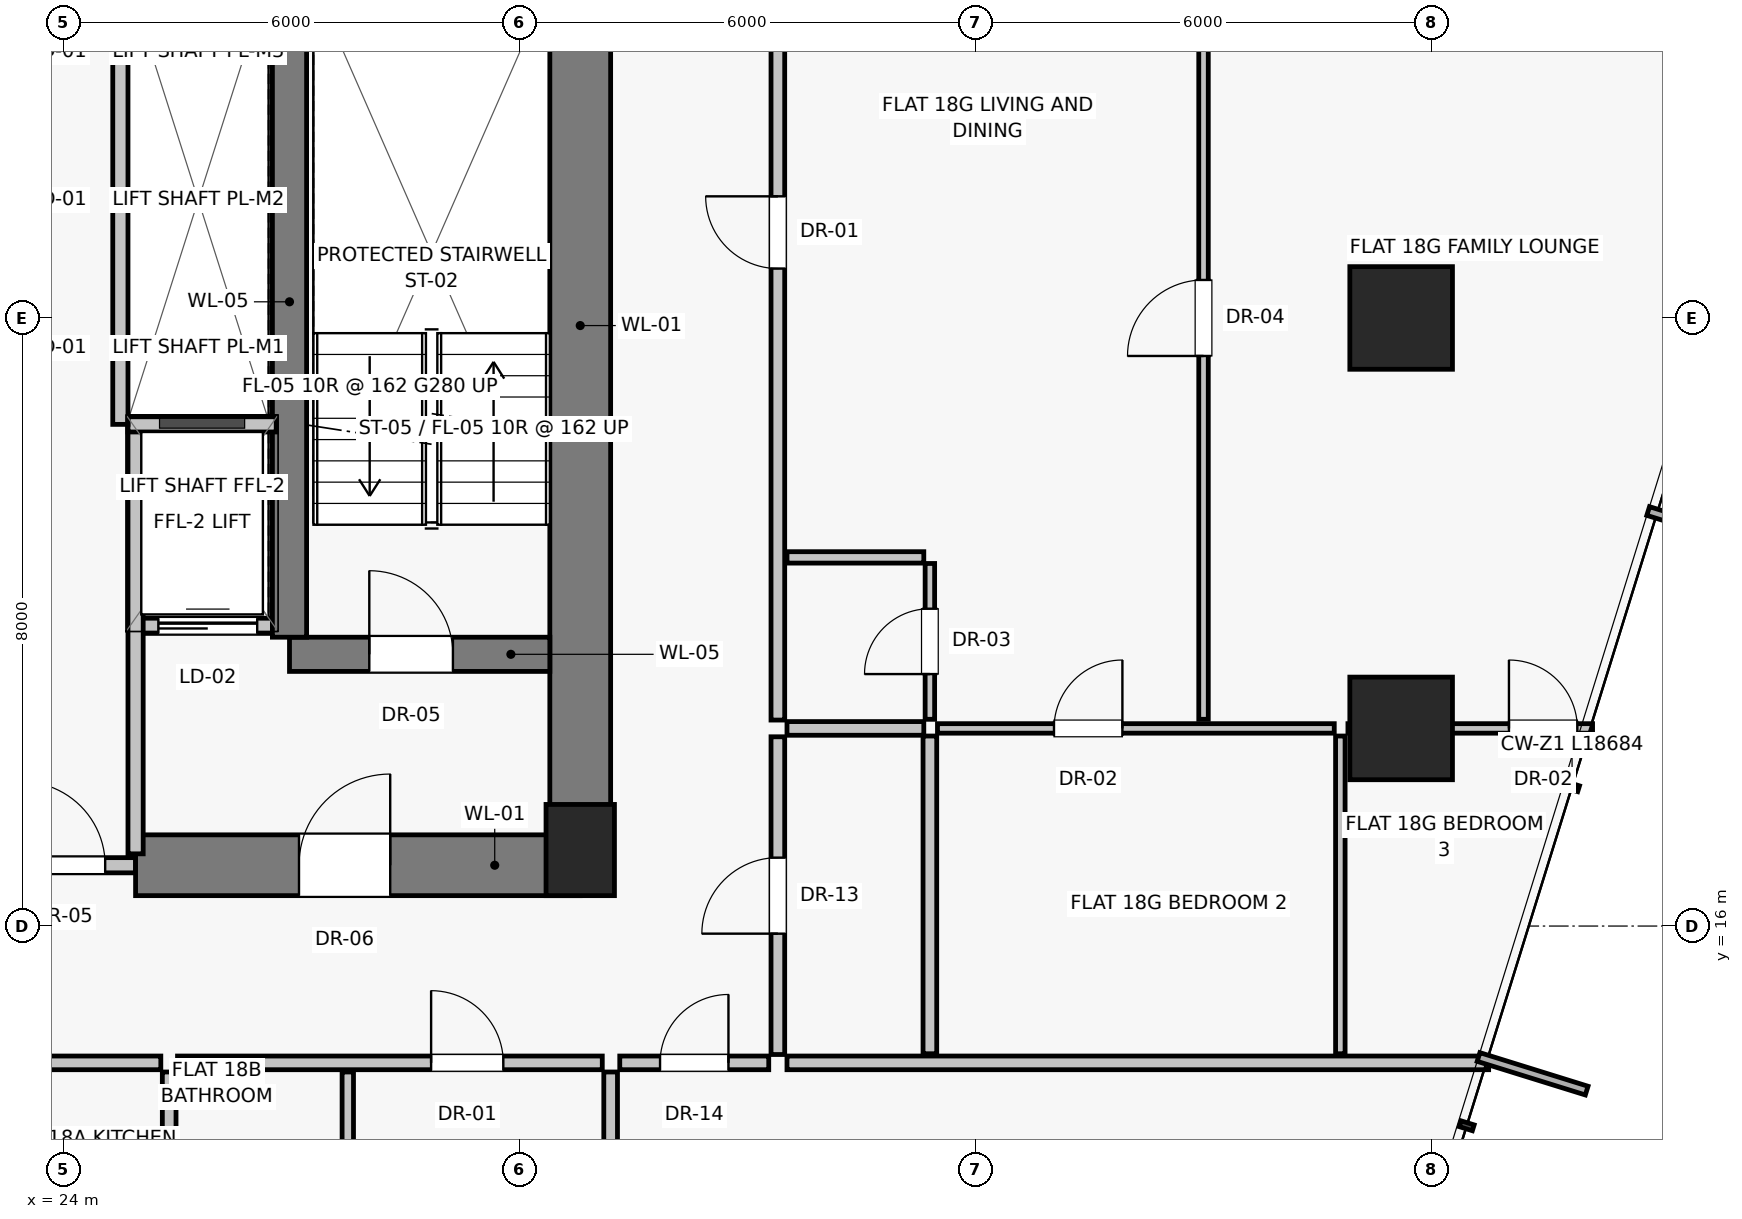
"""IFC4 building model, lengths in metres.
Left out: names, types, materials, properties, quantities, classifications, styles, units other than length and angle.
Written with IfcOpenShell. Run it as: python <this file> out.ifc"""

import sys

from ifc_helpers import new_model, si_unit, direction, frame, frame_2d, origin, origin_2d, place, context, subcontext, project, spatial, rectangle, extrude, source, transform, mapped, element, fill, save


model = new_model("IFC4")
c1 = context("Model", 3, precision=1e-05, world=origin(), true_north=direction((0.0, 1.0)))
c2 = subcontext(c1, "Body", "Model", "MODEL_VIEW")
j1 = project(units=[si_unit("LENGTHUNIT", "METRE"), si_unit("PLANEANGLEUNIT", "RADIAN")], contexts=[c1])
p1 = place(None, origin())
s1 = spatial("IfcSite", under=j1, at=p1, CompositionType="ELEMENT")
p2 = place(p1, origin())
s2 = spatial("IfcBuilding", under=s1, at=p2, CompositionType="ELEMENT")
p3 = place(p2, frame((0.0, 0.0, 67.35)))
s3 = spatial("IfcBuildingStorey", under=s2, at=p3, CompositionType="ELEMENT", Elevation=67.35)
p4 = place(p3, frame((30.8, 17.0, 0.0), z_axis=(0.0, 0.0, 1.0), x_axis=(1.0, 0.0, 0.0)))
e1 = element("IfcColumn", 1, at=p4, inside=s3, PredefinedType="PILASTER", context=c2, shape_type="SweptSolid", body=[
    extrude(rectangle(XDim=0.9, YDim=1.2, at=origin_2d()), origin(), (0.0, 0.0, 1.0), 3.25),
])
for number, where, z_axis, x_axis in (
    (2, (41.6, 18.6, 0.0), (0.0, 0.0, 1.0), (1.0, 0.0, 0.0)),
    (3, (41.6, 24.0, 0.0), (0.0, 0.0, 1.0), (1.0, 0.0, 0.0)),
):
    element("IfcColumn", number, at=place(p3, frame(where, z_axis=z_axis, x_axis=x_axis)), inside=s3, PredefinedType="COLUMN", context=c2, shape_type="SweptSolid", body=[
        extrude(rectangle(XDim=1.35, YDim=1.35, at=origin_2d()), origin(), (0.0, 0.0, 1.0), 3.25),
    ])
p5 = place(p3, frame((30.8, 16.8, 0.0), z_axis=(0.0, 0.0, 1.0), x_axis=(0.0, 1.0, 0.0)))
e4 = element("IfcWall", 4, at=p5, inside=s3, PredefinedType="SHEAR", context=c2, shape_type="SweptSolid", body=[
    extrude(rectangle(XDim=14.2, YDim=0.8, at=frame_2d((7.1, 0.0))), origin(), (0.0, 0.0, 1.0), 3.0),
])
p6 = place(p3, frame((23.05, 16.8, 0.0), z_axis=(0.0, 0.0, 1.0), x_axis=(1.0, 0.0, 0.0)))
e5 = element("IfcWall", 5, at=p6, inside=s3, PredefinedType="SOLIDWALL", context=c2, shape_type="SweptSolid", body=[
    extrude(rectangle(XDim=1.9, YDim=0.2, at=frame_2d((0.95, 0.0))), origin(), (0.0, 0.0, 1.0), 2.15),
])
p7 = place(p6, frame((0.4, 0.0, 0.0)))
e6 = element("IfcOpeningElement", 6, at=p7, cuts=e5, PredefinedType="OPENING", context=c2, shape_type="SweptSolid", body=[
    extrude(rectangle(XDim=1.1, YDim=2.03, at=frame_2d((0.55, 1.015))), frame((0.0, 0.11, 0.0), z_axis=(0.0, -1.0, 0.0), x_axis=(1.0, 0.0, 0.0)), (0.0, 0.0, 1.0), 0.22),
])
p8 = place(p3, frame((24.95, 16.8, 0.0), z_axis=(0.0, 0.0, 1.0), x_axis=(1.0, 0.0, 0.0)))
e7 = element("IfcWall", 7, at=p8, inside=s3, PredefinedType="SHEAR", context=c2, shape_type="SweptSolid", body=[
    extrude(rectangle(XDim=5.85, YDim=0.8, at=frame_2d((2.925, 0.0))), origin(), (0.0, 0.0, 1.0), 3.0),
])
p9 = place(p8, frame((2.15, 0.0, 0.0)))
e8 = element("IfcOpeningElement", 8, at=p9, cuts=e7, PredefinedType="OPENING", context=c2, shape_type="SweptSolid", body=[
    extrude(rectangle(XDim=1.2, YDim=2.03, at=frame_2d((0.6, 1.015))), frame((0.0, 0.41, 0.0), z_axis=(0.0, -1.0, 0.0), x_axis=(1.0, 0.0, 0.0)), (0.0, 0.0, 1.0), 0.82),
])
p10 = place(p3, frame((24.95, 19.95, 0.0), z_axis=(0.0, 0.0, 1.0), x_axis=(1.0, 0.0, 0.0)))
e9 = element("IfcWall", 9, at=p10, inside=s3, PredefinedType="SOLIDWALL", context=c2, shape_type="SweptSolid", body=[
    extrude(rectangle(XDim=1.85, YDim=0.2, at=frame_2d((0.925, 0.0))), origin(), (0.0, 0.0, 1.0), 3.0),
])
p11 = place(p10, frame((0.3, 0.0, 0.0)))
e10 = element("IfcOpeningElement", 10, at=p11, cuts=e9, PredefinedType="OPENING", context=c2, shape_type="SweptSolid", body=[
    extrude(rectangle(XDim=1.3, YDim=2.25, at=frame_2d((0.65, 1.125))), frame((0.0, 0.11, 0.0), z_axis=(0.0, -1.0, 0.0), x_axis=(1.0, 0.0, 0.0)), (0.0, 0.0, 1.0), 0.22),
])
p12 = place(p3, frame((26.975, 19.575, 0.0), z_axis=(0.0, 0.0, 1.0), x_axis=(1.0, 0.0, 0.0)))
e11 = element("IfcWall", 11, at=p12, inside=s3, PredefinedType="SHEAR", context=c2, shape_type="SweptSolid", body=[
    extrude(rectangle(XDim=3.425, YDim=0.45, at=frame_2d((1.712, 0.0))), origin(), (0.0, 0.0, 1.0), 3.0),
])
p13 = place(p12, frame((1.05, 0.0, 0.0)))
e12 = element("IfcOpeningElement", 12, at=p13, cuts=e11, PredefinedType="OPENING", context=c2, shape_type="SweptSolid", body=[
    extrude(rectangle(XDim=1.1, YDim=2.03, at=frame_2d((0.55, 1.015))), frame((0.0, 0.235, 0.0), z_axis=(0.0, -1.0, 0.0), x_axis=(1.0, 0.0, 0.0)), (0.0, 0.0, 1.0), 0.47),
])
p14 = place(p3, frame((26.975, 19.8, 0.0), z_axis=(0.0, 0.0, 1.0), x_axis=(0.0, 1.0, 0.0)))
e13 = element("IfcWall", 13, at=p14, inside=s3, PredefinedType="SHEAR", context=c2, shape_type="SweptSolid", body=[
    extrude(rectangle(XDim=8.825, YDim=0.45, at=frame_2d((4.413, 0.0))), origin(), (0.0, 0.0, 1.0), 3.0),
])
p15 = place(p3, frame((24.95, 16.95, 0.0), z_axis=(0.0, 0.0, 1.0), x_axis=(0.0, 1.0, 0.0)))
e14 = element("IfcWall", 14, at=p15, inside=s3, PredefinedType="SOLIDWALL", context=c2, shape_type="SweptSolid", body=[
    extrude(rectangle(XDim=5.6, YDim=0.2, at=frame_2d((2.8, 0.0))), origin(), (0.0, 0.0, 1.0), 3.0),
])
p16 = place(p3, frame((24.85, 22.6, 0.0), z_axis=(0.0, 0.0, 1.0), x_axis=(1.0, 0.0, 0.0)))
e15 = element("IfcWall", 15, at=p16, inside=s3, PredefinedType="SOLIDWALL", context=c2, shape_type="SweptSolid", body=[
    extrude(rectangle(XDim=1.95, YDim=0.2, at=frame_2d((0.975, 0.0))), origin(), (0.0, 0.0, 1.0), 3.0),
])
p17 = place(p3, frame((24.75, 22.6, 0.0), z_axis=(0.0, 0.0, 1.0), x_axis=(0.0, 1.0, 0.0)))
e16 = element("IfcWall", 16, at=p17, inside=s3, PredefinedType="SOLIDWALL", context=c2, shape_type="SweptSolid", body=[
    extrude(rectangle(XDim=5.95, YDim=0.2, at=frame_2d((2.975, 0.0))), origin(), (0.0, 0.0, 1.0), 3.0),
])
p18 = place(p3, frame((31.2, 14.08, 0.0), z_axis=(0.0, 0.0, 1.0), x_axis=(0.0, -1.0, 0.0)))
e17 = element("IfcWall", 17, at=p18, inside=s3, PredefinedType="PARTITIONING", context=c2, shape_type="SweptSolid", body=[
    extrude(rectangle(XDim=9.792, YDim=0.18, at=frame_2d((4.896, 0.0))), origin(), (0.0, 0.0, 1.0), 3.0),
])
p19 = place(p3, frame((16.91, 14.2, 0.0), z_axis=(0.0, 0.0, 1.0), x_axis=(1.0, 0.0, 0.0)))
e18 = element("IfcWall", 18, at=p19, inside=s3, PredefinedType="PARTITIONING", context=c2, shape_type="SweptSolid", body=[
    extrude(rectangle(XDim=8.372, YDim=0.18, at=frame_2d((4.186, 0.0))), origin(), (0.0, 0.0, 1.0), 3.0),
])
p20 = place(p19, frame((2.903, 0.0, 0.0)))
e19 = element("IfcOpeningElement", 19, at=p20, cuts=e18, PredefinedType="OPENING", context=c2, shape_type="SweptSolid", body=[
    extrude(rectangle(XDim=0.95, YDim=2.02, at=frame_2d((0.475, 1.01))), frame((0.0, 0.1, 0.0), z_axis=(0.0, -1.0, 0.0), x_axis=(1.0, 0.0, 0.0)), (0.0, 0.0, 1.0), 0.2),
])
p21 = place(p3, frame((25.392, 14.08, 0.0), z_axis=(0.0, 0.0, 1.0), x_axis=(0.0, -1.0, 0.0)))
e20 = element("IfcWall", 20, at=p21, inside=s3, PredefinedType="PARTITIONING", context=c2, shape_type="SweptSolid", body=[
    extrude(rectangle(XDim=11.105, YDim=0.18, at=frame_2d((5.553, 0.0))), origin(), (0.0, 0.0, 1.0), 3.0),
])
p22 = place(p3, frame((25.502, 14.2, 0.0), z_axis=(0.0, 0.0, 1.0), x_axis=(1.0, 0.0, 0.0)))
e21 = element("IfcWall", 21, at=p22, inside=s3, PredefinedType="PARTITIONING", context=c2, shape_type="SweptSolid", body=[
    extrude(rectangle(XDim=5.588, YDim=0.18, at=frame_2d((2.794, 0.0))), origin(), (0.0, 0.0, 1.0), 3.0),
])
p23 = place(p22, frame((3.336, 0.0, 0.0)))
e22 = element("IfcOpeningElement", 22, at=p23, cuts=e21, PredefinedType="OPENING", context=c2, shape_type="SweptSolid", body=[
    extrude(rectangle(XDim=0.95, YDim=2.02, at=frame_2d((0.475, 1.01))), frame((0.0, 0.1, 0.0), z_axis=(0.0, -1.0, 0.0), x_axis=(1.0, 0.0, 0.0)), (0.0, 0.0, 1.0), 0.2),
])
p24 = place(p3, frame((27.742, 14.08, 0.0), z_axis=(0.0, 0.0, 1.0), x_axis=(0.0, -1.0, 0.0)))
e23 = element("IfcWall", 23, at=p24, inside=s3, PredefinedType="PARTITIONING", context=c2, shape_type="SweptSolid", body=[
    extrude(rectangle(XDim=2.05, YDim=0.15, at=frame_2d((1.025, 0.0))), origin(), (0.0, 0.0, 1.0), 3.0),
])
p25 = place(p3, frame((33.52, 14.2, 0.0), z_axis=(0.0, 0.0, 1.0), x_axis=(1.0, 0.0, 0.0)))
e24 = element("IfcWall", 24, at=p25, inside=s3, PredefinedType="PARTITIONING", context=c2, shape_type="SweptSolid", body=[
    extrude(rectangle(XDim=9.231, YDim=0.18, at=frame_2d((4.616, 0.0))), origin(), (0.0, 0.0, 1.0), 3.0),
])
p26 = place(p3, frame((33.4, 14.31, 0.0), z_axis=(0.0, 0.0, 1.0), x_axis=(0.0, 1.0, 0.0)))
e25 = element("IfcWall", 25, at=p26, inside=s3, PredefinedType="PARTITIONING", context=c2, shape_type="SweptSolid", body=[
    extrude(rectangle(XDim=4.18, YDim=0.18, at=frame_2d((2.09, 0.0))), origin(), (0.0, 0.0, 1.0), 3.0),
])
p27 = place(p26, frame((1.59, 0.0, 0.0)))
e26 = element("IfcOpeningElement", 26, at=p27, cuts=e25, PredefinedType="OPENING", context=c2, shape_type="SweptSolid", body=[
    extrude(rectangle(XDim=1.0, YDim=2.01, at=frame_2d((0.5, 1.005))), frame((0.0, 0.1, 0.0), z_axis=(0.0, -1.0, 0.0), x_axis=(1.0, 0.0, 0.0)), (0.0, 0.0, 1.0), 0.2),
])
p28 = place(p3, frame((33.4, 18.71, 0.0), z_axis=(0.0, 0.0, 1.0), x_axis=(0.0, 1.0, 0.0)))
e27 = element("IfcWall", 27, at=p28, inside=s3, PredefinedType="PARTITIONING", context=c2, shape_type="SweptSolid", body=[
    extrude(rectangle(XDim=14.78, YDim=0.18, at=frame_2d((7.39, 0.0))), origin(), (0.0, 0.0, 1.0), 3.0),
])
p29 = place(p28, frame((5.94, 0.0, 0.0)))
e28 = element("IfcOpeningElement", 28, at=p29, cuts=e27, PredefinedType="OPENING", context=c2, shape_type="SweptSolid", body=[
    extrude(rectangle(XDim=0.95, YDim=2.02, at=frame_2d((0.475, 1.01))), frame((0.0, 0.1, 0.0), z_axis=(0.0, -1.0, 0.0), x_axis=(1.0, 0.0, 0.0)), (0.0, 0.0, 1.0), 0.2),
])
p30 = place(p3, frame((40.8, 14.32, 0.0), z_axis=(0.0, 0.0, 1.0), x_axis=(0.0, 1.0, 0.0)))
e29 = element("IfcWall", 29, at=p30, inside=s3, PredefinedType="PARTITIONING", context=c2, shape_type="SweptSolid", body=[
    extrude(rectangle(XDim=4.18, YDim=0.125, at=frame_2d((2.09, 0.0))), origin(), (0.0, 0.0, 1.0), 3.0),
])
p31 = place(p3, frame((40.9, 18.6, 0.0), z_axis=(0.0, 0.0, 1.0), x_axis=(1.0, 0.0, 0.0)))
e30 = element("IfcWall", 30, at=p31, inside=s3, PredefinedType="PARTITIONING", context=c2, shape_type="SweptSolid", body=[
    extrude(rectangle(XDim=3.219, YDim=0.125, at=frame_2d((1.609, 0.0))), origin(), (0.0, 0.0, 1.0), 2.299),
])
p32 = place(p31, frame((2.118, 0.0, 0.0)))
e31 = element("IfcOpeningElement", 31, at=p32, cuts=e30, PredefinedType="OPENING", context=c2, shape_type="SweptSolid", body=[
    extrude(rectangle(XDim=0.9, YDim=2.01, at=frame_2d((0.45, 1.005))), frame((0.0, 0.073, 0.0), z_axis=(0.0, -1.0, 0.0), x_axis=(1.0, 0.0, 0.0)), (0.0, 0.0, 1.0), 0.145),
])
p33 = place(p3, frame((39.0, 18.72, 0.0), z_axis=(0.0, 0.0, 1.0), x_axis=(0.0, 1.0, 0.0)))
e32 = element("IfcWall", 32, at=p33, inside=s3, PredefinedType="PARTITIONING", context=c2, shape_type="SweptSolid", body=[
    extrude(rectangle(XDim=10.56, YDim=0.125, at=frame_2d((5.28, 0.0))), origin(), (0.0, 0.0, 1.0), 3.0),
])
p34 = place(p33, frame((4.78, 0.0, 0.0)))
e33 = element("IfcOpeningElement", 33, at=p34, cuts=e32, PredefinedType="OPENING", context=c2, shape_type="SweptSolid", body=[
    extrude(rectangle(XDim=1.0, YDim=2.01, at=frame_2d((0.5, 1.005))), frame((0.0, 0.073, 0.0), z_axis=(0.0, -1.0, 0.0), x_axis=(1.0, 0.0, 0.0)), (0.0, 0.0, 1.0), 0.145),
])
p35 = place(p3, frame((35.4, 14.32, 0.0), z_axis=(0.0, 0.0, 1.0), x_axis=(0.0, 1.0, 0.0)))
e34 = element("IfcWall", 34, at=p35, inside=s3, PredefinedType="PARTITIONING", context=c2, shape_type="SweptSolid", body=[
    extrude(rectangle(XDim=4.18, YDim=0.18, at=frame_2d((2.09, 0.0))), origin(), (0.0, 0.0, 1.0), 3.0),
])
p36 = place(p3, frame((33.52, 18.6, 0.0), z_axis=(0.0, 0.0, 1.0), x_axis=(1.0, 0.0, 0.0)))
e35 = element("IfcWall", 35, at=p36, inside=s3, PredefinedType="PARTITIONING", context=c2, shape_type="SweptSolid", body=[
    extrude(rectangle(XDim=1.8, YDim=0.18, at=frame_2d((0.9, 0.0))), origin(), (0.0, 0.0, 1.0), 3.0),
])
p37 = place(p3, frame((35.5, 18.6, 0.0), z_axis=(0.0, 0.0, 1.0), x_axis=(1.0, 0.0, 0.0)))
e36 = element("IfcWall", 36, at=p37, inside=s3, PredefinedType="PARTITIONING", context=c2, shape_type="SweptSolid", body=[
    extrude(rectangle(XDim=5.22, YDim=0.125, at=frame_2d((2.61, 0.0))), origin(), (0.0, 0.0, 1.0), 2.299),
])
p38 = place(p37, frame((1.533, 0.0, 0.0)))
e37 = element("IfcOpeningElement", 37, at=p38, cuts=e36, PredefinedType="OPENING", context=c2, shape_type="SweptSolid", body=[
    extrude(rectangle(XDim=0.9, YDim=2.01, at=frame_2d((0.45, 1.005))), frame((0.0, 0.073, 0.0), z_axis=(0.0, -1.0, 0.0), x_axis=(1.0, 0.0, 0.0)), (0.0, 0.0, 1.0), 0.145),
])
p39 = place(p3, frame((33.52, 20.85, 0.0), z_axis=(0.0, 0.0, 1.0), x_axis=(1.0, 0.0, 0.0)))
e38 = element("IfcWall", 38, at=p39, inside=s3, PredefinedType="PARTITIONING", context=c2, shape_type="SweptSolid", body=[
    extrude(rectangle(XDim=1.8, YDim=0.15, at=frame_2d((0.9, 0.0))), origin(), (0.0, 0.0, 1.0), 3.0),
])
p40 = place(p3, frame((35.4, 18.72, 0.0), z_axis=(0.0, 0.0, 1.0), x_axis=(0.0, 1.0, 0.0)))
e39 = element("IfcWall", 39, at=p40, inside=s3, PredefinedType="PARTITIONING", context=c2, shape_type="SweptSolid", body=[
    extrude(rectangle(XDim=2.05, YDim=0.125, at=frame_2d((1.025, 0.0))), origin(), (0.0, 0.0, 1.0), 3.0),
])
p41 = place(p40, frame((0.595, 0.0, 0.0)))
e40 = element("IfcOpeningElement", 40, at=p41, cuts=e39, PredefinedType="OPENING", context=c2, shape_type="SweptSolid", body=[
    extrude(rectangle(XDim=0.86, YDim=2.01, at=frame_2d((0.43, 1.005))), frame((0.0, 0.073, 0.0), z_axis=(0.0, -1.0, 0.0), x_axis=(1.0, 0.0, 0.0)), (0.0, 0.0, 1.0), 0.145),
])
p42 = place(p3, frame((31.32, 14.2, 0.0), z_axis=(0.0, 0.0, 1.0), x_axis=(1.0, 0.0, 0.0)))
e41 = element("IfcWall", 41, at=p42, inside=s3, PredefinedType="PARTITIONING", context=c2, shape_type="SweptSolid", body=[
    extrude(rectangle(XDim=1.96, YDim=0.18, at=frame_2d((0.98, 0.0))), origin(), (0.0, 0.0, 1.0), 3.0),
])
p43 = place(p42, frame((0.53, 0.0, 0.0)))
e42 = element("IfcOpeningElement", 42, at=p43, cuts=e41, PredefinedType="OPENING", context=c2, shape_type="SweptSolid", body=[
    extrude(rectangle(XDim=0.9, YDim=2.01, at=frame_2d((0.45, 1.005))), frame((0.0, 0.1, 0.0), z_axis=(0.0, -1.0, 0.0), x_axis=(1.0, 0.0, 0.0)), (0.0, 0.0, 1.0), 0.2),
])
m1 = source(origin(), c2, "Body", "SweptSolid", [
    extrude(rectangle(XDim=1.1, YDim=2.03, at=frame_2d((0.55, 1.015))), frame((0.0, 0.025, 0.0), z_axis=(0.0, -1.0, 0.0), x_axis=(1.0, 0.0, 0.0)), (0.0, 0.0, 1.0), 0.05),
])
p44 = place(p7, origin())
e43 = element("IfcDoor", 43, at=p44, inside=s3, OperationType="SINGLE_SWING_LEFT", PredefinedType="DOOR", context=c2, shape_type="MappedRepresentation", body=[
    mapped(m1, transform((0.0, 0.0, 0.0), scale=1.0)),
])
fill(e6, e43)
m2 = source(origin(), c2, "Body", "SweptSolid", [
    extrude(rectangle(XDim=1.2, YDim=2.03, at=frame_2d((0.6, 1.015))), frame((0.0, 0.025, 0.0), z_axis=(0.0, -1.0, 0.0), x_axis=(1.0, 0.0, 0.0)), (0.0, 0.0, 1.0), 0.05),
])
p45 = place(p9, origin())
e44 = element("IfcDoor", 44, at=p45, inside=s3, OperationType="SINGLE_SWING_RIGHT", PredefinedType="DOOR", context=c2, shape_type="MappedRepresentation", body=[
    mapped(m2, transform((0.0, 0.0, 0.0), scale=1.0)),
])
fill(e8, e44)
m3 = source(origin(), c2, "Body", "SweptSolid", [
    extrude(rectangle(XDim=1.3, YDim=2.25, at=frame_2d((0.65, 1.125))), frame((0.0, 0.025, 0.0), z_axis=(0.0, -1.0, 0.0), x_axis=(1.0, 0.0, 0.0)), (0.0, 0.0, 1.0), 0.05),
])
p46 = place(p11, origin())
e45 = element("IfcDoor", 45, at=p46, inside=s3, OperationType="SLIDING_TO_LEFT", PredefinedType="DOOR", context=c2, shape_type="MappedRepresentation", body=[
    mapped(m3, transform((0.0, 0.0, 0.0), scale=1.0)),
])
fill(e10, e45)
p47 = place(p13, origin())
e46 = element("IfcDoor", 46, at=p47, inside=s3, OperationType="SINGLE_SWING_LEFT", PredefinedType="DOOR", context=c2, shape_type="MappedRepresentation", body=[
    mapped(m1, transform((0.0, 0.0, 0.0), scale=1.0)),
])
fill(e12, e46)
m4 = source(origin(), c2, "Body", "SweptSolid", [
    extrude(rectangle(XDim=0.95, YDim=2.02, at=frame_2d((0.475, 1.01))), frame((0.0, 0.025, 0.0), z_axis=(0.0, -1.0, 0.0), x_axis=(1.0, 0.0, 0.0)), (0.0, 0.0, 1.0), 0.05),
])
p48 = place(p23, origin())
e47 = element("IfcDoor", 47, at=p48, inside=s3, OperationType="SINGLE_SWING_LEFT", PredefinedType="DOOR", context=c2, shape_type="MappedRepresentation", body=[
    mapped(m4, transform((0.0, 0.0, 0.0), scale=1.0)),
])
fill(e22, e47)
m5 = source(origin(), c2, "Body", "SweptSolid", [
    extrude(rectangle(XDim=1.0, YDim=2.01, at=frame_2d((0.5, 1.005))), frame((0.0, 0.025, 0.0), z_axis=(0.0, -1.0, 0.0), x_axis=(1.0, 0.0, 0.0)), (0.0, 0.0, 1.0), 0.05),
])
p49 = place(p27, origin())
e48 = element("IfcDoor", 48, at=p49, inside=s3, OperationType="SINGLE_SWING_LEFT", PredefinedType="DOOR", context=c2, shape_type="MappedRepresentation", body=[
    mapped(m5, transform((0.0, 0.0, 0.0), scale=1.0)),
])
fill(e26, e48)
p50 = place(p29, origin())
e49 = element("IfcDoor", 49, at=p50, inside=s3, OperationType="SINGLE_SWING_RIGHT", PredefinedType="DOOR", context=c2, shape_type="MappedRepresentation", body=[
    mapped(m4, transform((0.0, 0.0, 0.0), scale=1.0)),
])
fill(e28, e49)
m6 = source(origin(), c2, "Body", "SweptSolid", [
    extrude(rectangle(XDim=0.9, YDim=2.01, at=frame_2d((0.45, 1.005))), frame((0.0, 0.025, 0.0), z_axis=(0.0, -1.0, 0.0), x_axis=(1.0, 0.0, 0.0)), (0.0, 0.0, 1.0), 0.05),
])
p51 = place(p32, origin())
e50 = element("IfcDoor", 50, at=p51, inside=s3, OperationType="SINGLE_SWING_LEFT", PredefinedType="DOOR", context=c2, shape_type="MappedRepresentation", body=[
    mapped(m6, transform((0.0, 0.0, 0.0), scale=1.0)),
])
fill(e31, e50)
p52 = place(p34, origin())
e51 = element("IfcDoor", 51, at=p52, inside=s3, OperationType="SINGLE_SWING_LEFT", PredefinedType="DOOR", context=c2, shape_type="MappedRepresentation", body=[
    mapped(m5, transform((0.0, 0.0, 0.0), scale=1.0)),
])
fill(e33, e51)
p53 = place(p38, origin())
e52 = element("IfcDoor", 52, at=p53, inside=s3, OperationType="SINGLE_SWING_RIGHT", PredefinedType="DOOR", context=c2, shape_type="MappedRepresentation", body=[
    mapped(m6, transform((0.0, 0.0, 0.0), scale=1.0)),
])
fill(e37, e52)
m7 = source(origin(), c2, "Body", "SweptSolid", [
    extrude(rectangle(XDim=0.86, YDim=2.01, at=frame_2d((0.43, 1.005))), frame((0.0, 0.025, 0.0), z_axis=(0.0, -1.0, 0.0), x_axis=(1.0, 0.0, 0.0)), (0.0, 0.0, 1.0), 0.05),
])
p54 = place(p41, origin())
e53 = element("IfcDoor", 53, at=p54, inside=s3, OperationType="SINGLE_SWING_LEFT", PredefinedType="DOOR", context=c2, shape_type="MappedRepresentation", body=[
    mapped(m7, transform((0.0, 0.0, 0.0), scale=1.0)),
])
fill(e40, e53)
p55 = place(p43, origin())
e54 = element("IfcDoor", 54, at=p55, inside=s3, OperationType="SINGLE_SWING_RIGHT", PredefinedType="DOOR", context=c2, shape_type="MappedRepresentation", body=[
    mapped(m6, transform((0.0, 0.0, 0.0), scale=1.0)),
])
fill(e42, e54)
save(model, sys.argv[1])
